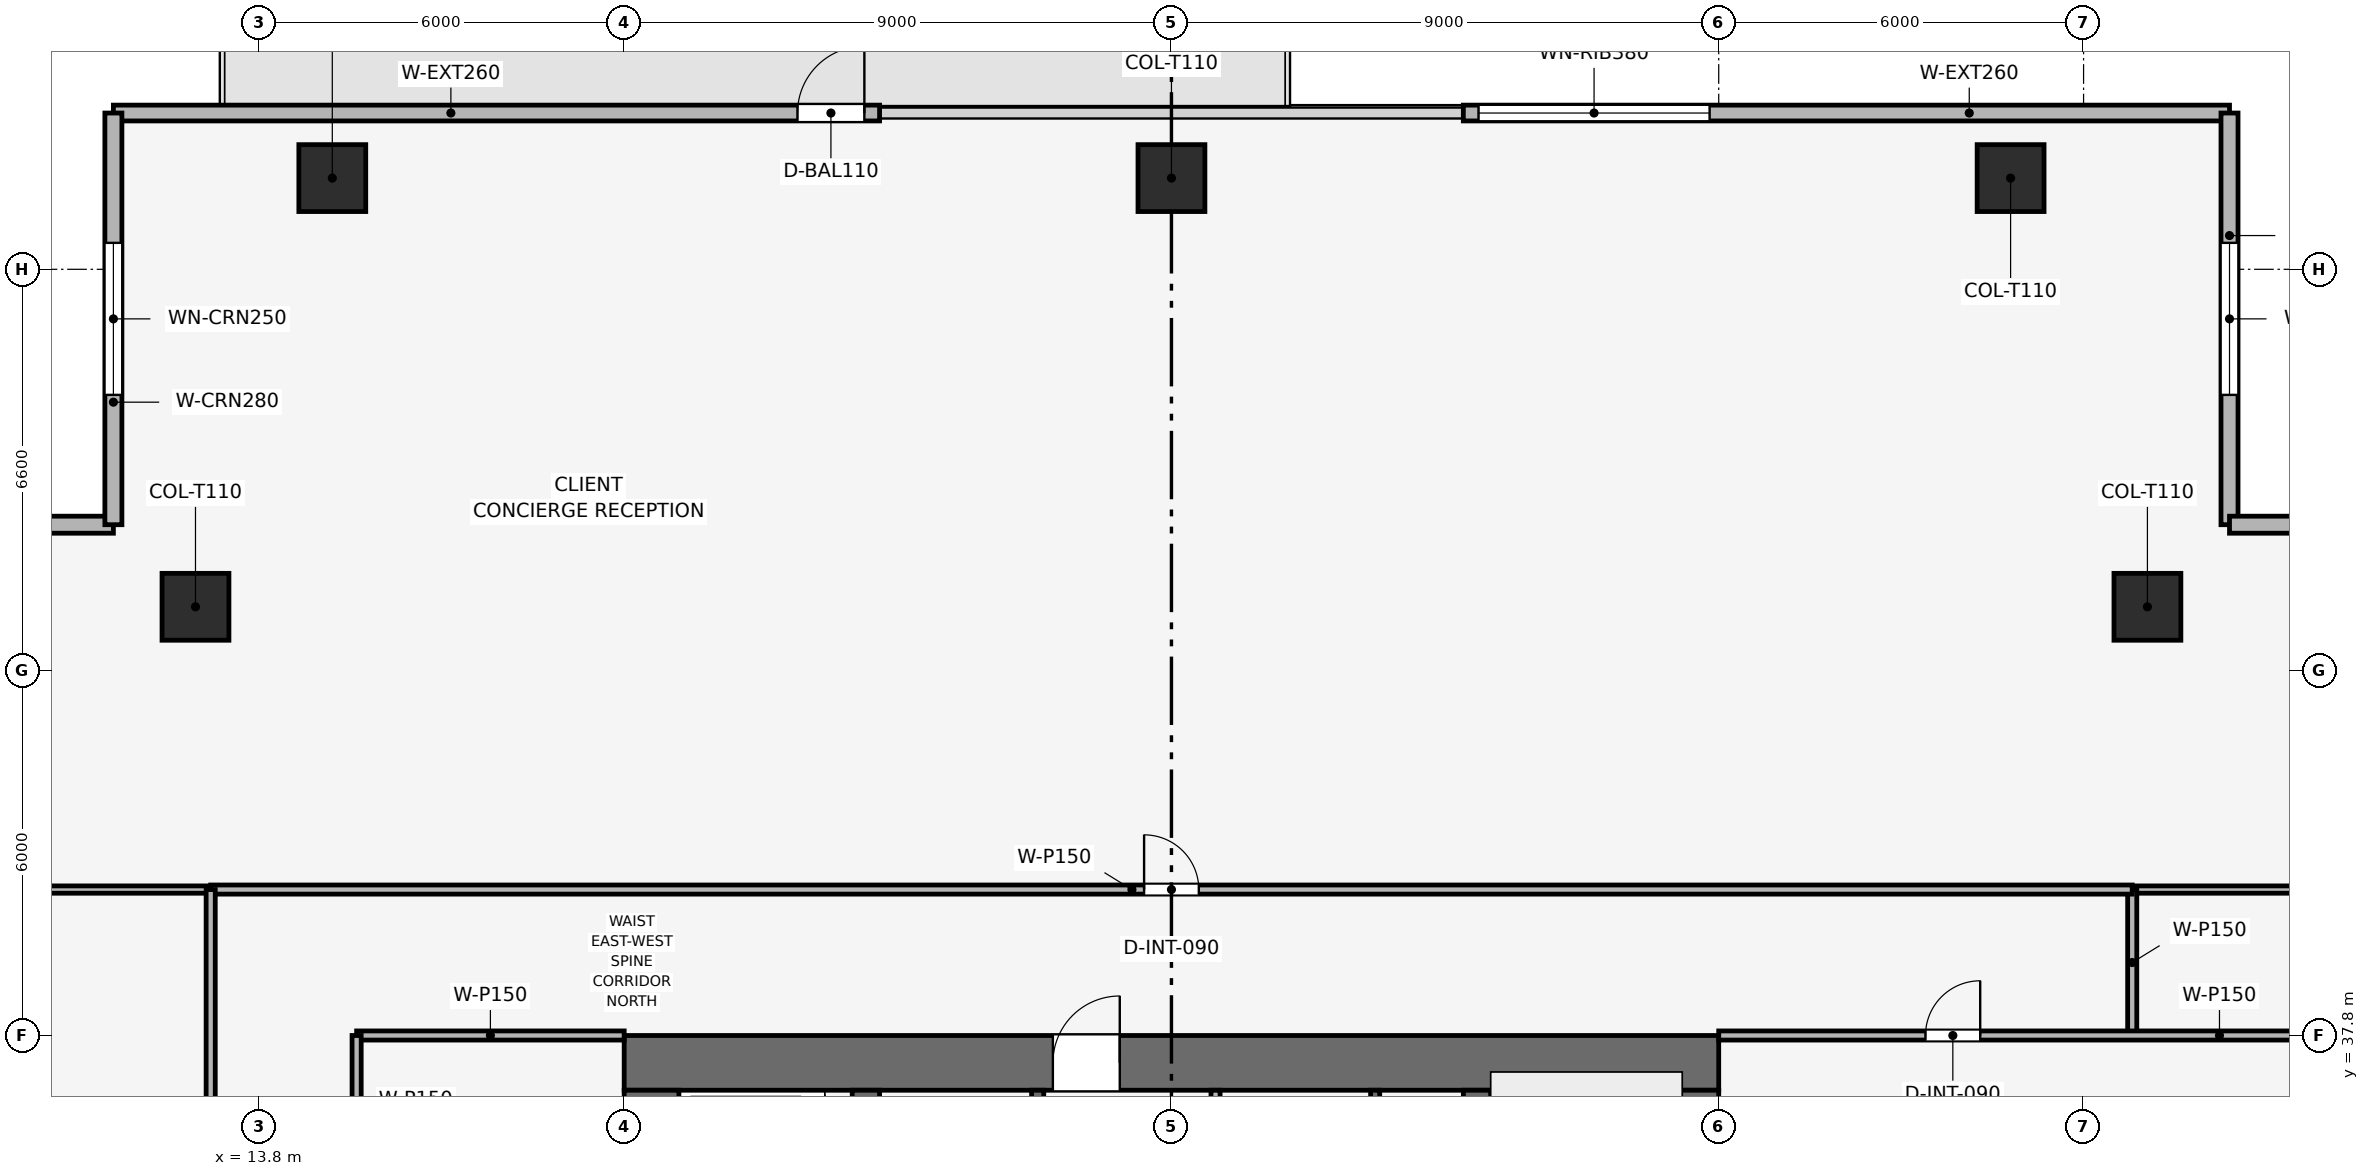
"""IFC4 building model, lengths in metres.
Left out: names, types, materials, properties, quantities, classifications, styles, units other than length and angle.
Written with IfcOpenShell. Run it as: python <this file> out.ifc"""

import sys

from ifc_helpers import new_model, si_unit, direction, frame, frame_2d, origin, origin_2d, place, context, subcontext, project, spatial, rectangle, extrude, element, fill, save


model = new_model("IFC4")
c1 = context("Model", 3, precision=1e-05, world=origin(), true_north=direction((0.0, 1.0)))
c2 = subcontext(c1, "Body", "Model", "MODEL_VIEW")
j1 = project(units=[si_unit("LENGTHUNIT", "METRE"), si_unit("PLANEANGLEUNIT", "RADIAN")], contexts=[c1])
p1 = place(None, origin())
s1 = spatial("IfcSite", under=j1, at=p1, CompositionType="ELEMENT")
p2 = place(p1, origin())
s2 = spatial("IfcBuilding", under=s1, at=p2, CompositionType="ELEMENT")
p3 = place(p2, frame((0.0, 0.0, 179.55)))
s3 = spatial("IfcBuildingStorey", under=s2, at=p3, CompositionType="ELEMENT", Elevation=179.55)
p4 = place(p3, frame((19.8, 37.35, 0.0), z_axis=(0.0, 0.0, 1.0), x_axis=(1.0, 0.0, 0.0)))
e1 = element("IfcWall", 1, at=p4, inside=s3, PredefinedType="SHEAR", context=c2, shape_type="SweptSolid", body=[
    extrude(rectangle(XDim=18.0, YDim=0.9, at=frame_2d((9.0, 0.0))), origin(), (0.0, 0.0, 1.0), 3.75),
])
p5 = place(p4, frame((7.05, 0.0, 0.0)))
e2 = element("IfcOpeningElement", 2, at=p5, cuts=e1, PredefinedType="OPENING", context=c2, shape_type="SweptSolid", body=[
    extrude(rectangle(XDim=1.1, YDim=2.15, at=frame_2d((0.55, 1.075))), frame((0.0, 0.46, 0.0), z_axis=(0.0, -1.0, 0.0), x_axis=(1.0, 0.0, 0.0)), (0.0, 0.0, 1.0), 0.92),
])
p6 = place(p3, frame((20.25, 20.7, 0.0), z_axis=(0.0, 0.0, 1.0), x_axis=(0.0, 1.0, 0.0)))
e3 = element("IfcWall", 3, at=p6, inside=s3, PredefinedType="SHEAR", context=c2, shape_type="SweptSolid", body=[
    extrude(rectangle(XDim=16.2, YDim=0.9, at=frame_2d((8.1, 0.0))), origin(), (0.0, 0.0, 1.0), 3.75),
])
p7 = place(p6, frame((10.1, 0.0, 0.0)))
e4 = element("IfcOpeningElement", 4, at=p7, cuts=e3, PredefinedType="OPENING", context=c2, shape_type="SweptSolid", body=[
    extrude(rectangle(XDim=1.1, YDim=2.15, at=frame_2d((0.55, 1.075))), frame((0.0, 0.46, 0.0), z_axis=(0.0, -1.0, 0.0), x_axis=(1.0, 0.0, 0.0)), (0.0, 0.0, 1.0), 0.92),
])
p8 = place(p3, frame((37.35, 20.7, 0.0), z_axis=(0.0, 0.0, 1.0), x_axis=(0.0, 1.0, 0.0)))
e5 = element("IfcWall", 5, at=p8, inside=s3, PredefinedType="SHEAR", context=c2, shape_type="SweptSolid", body=[
    extrude(rectangle(XDim=16.2, YDim=0.9, at=frame_2d((8.1, 0.0))), origin(), (0.0, 0.0, 1.0), 3.75),
])
p9 = place(p8, frame((4.6, 0.0, 0.0)))
e6 = element("IfcOpeningElement", 6, at=p9, cuts=e5, PredefinedType="OPENING", context=c2, shape_type="SweptSolid", body=[
    extrude(rectangle(XDim=1.1, YDim=2.15, at=frame_2d((0.55, 1.075))), frame((0.0, 0.46, 0.0), z_axis=(0.0, -1.0, 0.0), x_axis=(1.0, 0.0, 0.0)), (0.0, 0.0, 1.0), 0.92),
])
for number, where, z_axis, x_axis in (
    (7, (23.775, 20.7, 0.0), (0.0, 0.0, 1.0), (0.0, 1.0, 0.0)),
    (8, (33.825, 20.7, 0.0), (0.0, 0.0, 1.0), (0.0, 1.0, 0.0)),
):
    element("IfcWall", number, at=place(p3, frame(where, z_axis=z_axis, x_axis=x_axis)), inside=s3, PredefinedType="SHEAR", context=c2, shape_type="SweptSolid", body=[
        extrude(rectangle(XDim=16.2, YDim=0.45, at=frame_2d((8.1, 0.0))), origin(), (0.0, 0.0, 1.0), 3.75),
    ])
for number, where, z_axis, x_axis in (
    (9, (42.6, 51.9, 0.003), (0.0, 0.0, 1.0), (1.0, 0.0, 0.0)),
    (10, (28.8, 51.9, 0.003), (0.0, 0.0, 1.0), (1.0, 0.0, 0.0)),
    (11, (15.0, 51.9, 0.003), (0.0, 0.0, 1.0), (1.0, 0.0, 0.0)),
    (12, (44.85, 44.85, 0.003), (0.0, 0.0, 1.0), (1.0, 0.0, 0.0)),
    (13, (12.75, 44.85, 0.003), (0.0, 0.0, 1.0), (1.0, 0.0, 0.0)),
):
    element("IfcColumn", number, at=place(p3, frame(where, z_axis=z_axis, x_axis=x_axis)), inside=s3, PredefinedType="COLUMN", context=c2, shape_type="SweptSolid", body=[
        extrude(rectangle(XDim=1.1, YDim=1.1, at=origin_2d()), origin(), (0.0, 0.0, 1.0), 3.489),
    ])
p10 = place(p3, frame((11.4, 52.97, 0.0), z_axis=(0.0, 0.0, 1.0), x_axis=(1.0, 0.0, 0.0)))
e14 = element("IfcWall", 14, at=p10, inside=s3, PredefinedType="SOLIDWALL", context=c2, shape_type="SweptSolid", body=[
    extrude(rectangle(XDim=12.6, YDim=0.26, at=frame_2d((6.3, 0.0))), origin(), (0.0, 0.0, 1.0), 3.495),
])
p11 = place(p10, frame((11.25, 0.0, 0.0)))
e15 = element("IfcOpeningElement", 15, at=p11, cuts=e14, PredefinedType="OPENING", context=c2, shape_type="SweptSolid", body=[
    extrude(rectangle(XDim=1.1, YDim=2.2, at=frame_2d((0.55, 1.1))), frame((0.0, 0.14, 0.0), z_axis=(0.0, -1.0, 0.0), x_axis=(1.0, 0.0, 0.0)), (0.0, 0.0, 1.0), 0.28),
])
p12 = place(p3, frame((33.6, 52.97, 0.0), z_axis=(0.0, 0.0, 1.0), x_axis=(1.0, 0.0, 0.0)))
e16 = element("IfcWall", 16, at=p12, inside=s3, PredefinedType="SOLIDWALL", context=c2, shape_type="SweptSolid", body=[
    extrude(rectangle(XDim=12.6, YDim=0.26, at=frame_2d((6.3, 0.0))), origin(), (0.0, 0.0, 1.0), 3.495),
])
p13 = place(p12, frame((0.25, 0.0, 0.9)))
e17 = element("IfcOpeningElement", 17, at=p13, cuts=e16, PredefinedType="OPENING", context=c2, shape_type="SweptSolid", body=[
    extrude(rectangle(XDim=3.8, YDim=1.9, at=frame_2d((1.9, 0.95))), frame((0.0, 0.14, 0.0), z_axis=(0.0, -1.0, 0.0), x_axis=(1.0, 0.0, 0.0)), (0.0, 0.0, 1.0), 0.28),
])
p14 = place(p3, frame((4.63, 46.2, 0.0), z_axis=(0.0, 0.0, 1.0), x_axis=(1.0, 0.0, 0.0)))
e18 = element("IfcWall", 18, at=p14, inside=s3, PredefinedType="SOLIDWALL", context=c2, shape_type="SweptSolid", body=[
    extrude(rectangle(XDim=6.77, YDim=0.28, at=frame_2d((3.385, 0.0))), origin(), (0.0, 0.0, 1.0), 3.495),
])
p15 = place(p14, frame((2.135, 0.0, 0.9)))
e19 = element("IfcOpeningElement", 19, at=p15, cuts=e18, PredefinedType="OPENING", context=c2, shape_type="SweptSolid", body=[
    extrude(rectangle(XDim=2.5, YDim=1.9, at=frame_2d((1.25, 0.95))), frame((0.0, 0.15, 0.0), z_axis=(0.0, -1.0, 0.0), x_axis=(1.0, 0.0, 0.0)), (0.0, 0.0, 1.0), 0.3),
])
p16 = place(p3, frame((11.4, 46.2, 0.0), z_axis=(0.0, 0.0, 1.0), x_axis=(0.0, 1.0, 0.0)))
e20 = element("IfcWall", 20, at=p16, inside=s3, PredefinedType="SOLIDWALL", context=c2, shape_type="SweptSolid", body=[
    extrude(rectangle(XDim=6.77, YDim=0.28, at=frame_2d((3.385, 0.0))), origin(), (0.0, 0.0, 1.0), 3.495),
])
p17 = place(p16, frame((2.135, 0.0, 0.9)))
e21 = element("IfcOpeningElement", 21, at=p17, cuts=e20, PredefinedType="OPENING", context=c2, shape_type="SweptSolid", body=[
    extrude(rectangle(XDim=2.5, YDim=1.9, at=frame_2d((1.25, 0.95))), frame((0.0, 0.15, 0.0), z_axis=(0.0, -1.0, 0.0), x_axis=(1.0, 0.0, 0.0)), (0.0, 0.0, 1.0), 0.3),
])
p18 = place(p3, frame((46.2, 52.97, 0.0), z_axis=(0.0, 0.0, 1.0), x_axis=(0.0, -1.0, 0.0)))
e22 = element("IfcWall", 22, at=p18, inside=s3, PredefinedType="SOLIDWALL", context=c2, shape_type="SweptSolid", body=[
    extrude(rectangle(XDim=6.77, YDim=0.28, at=frame_2d((3.385, 0.0))), origin(), (0.0, 0.0, 1.0), 3.495),
])
p19 = place(p18, frame((2.135, 0.0, 0.9)))
e23 = element("IfcOpeningElement", 23, at=p19, cuts=e22, PredefinedType="OPENING", context=c2, shape_type="SweptSolid", body=[
    extrude(rectangle(XDim=2.5, YDim=1.9, at=frame_2d((1.25, 0.95))), frame((0.0, 0.15, 0.0), z_axis=(0.0, -1.0, 0.0), x_axis=(1.0, 0.0, 0.0)), (0.0, 0.0, 1.0), 0.3),
])
p20 = place(p3, frame((46.2, 46.2, 0.0), z_axis=(0.0, 0.0, 1.0), x_axis=(1.0, 0.0, 0.0)))
e24 = element("IfcWall", 24, at=p20, inside=s3, PredefinedType="SOLIDWALL", context=c2, shape_type="SweptSolid", body=[
    extrude(rectangle(XDim=6.77, YDim=0.28, at=frame_2d((3.385, 0.0))), origin(), (0.0, 0.0, 1.0), 3.495),
])
p21 = place(p20, frame((2.135, 0.0, 0.9)))
e25 = element("IfcOpeningElement", 25, at=p21, cuts=e24, PredefinedType="OPENING", context=c2, shape_type="SweptSolid", body=[
    extrude(rectangle(XDim=2.5, YDim=1.9, at=frame_2d((1.25, 0.95))), frame((0.0, 0.15, 0.0), z_axis=(0.0, -1.0, 0.0), x_axis=(1.0, 0.0, 0.0)), (0.0, 0.0, 1.0), 0.3),
])
p22 = place(p3, frame((32.15, 34.0, 0.0), z_axis=(0.0, 0.0, 1.0), x_axis=(0.0, 1.0, 0.0)))
e26 = element("IfcWall", 26, at=p22, inside=s3, PredefinedType="SHEAR", context=c2, shape_type="SweptSolid", body=[
    extrude(rectangle(XDim=2.9, YDim=0.15, at=frame_2d((1.45, 0.0))), origin(), (0.0, 0.0, 1.0), 3.495),
])
p23 = place(p3, frame((26.6, 34.0, 0.0), z_axis=(0.0, 0.0, 1.0), x_axis=(0.0, 1.0, 0.0)))
e27 = element("IfcWall", 27, at=p23, inside=s3, PredefinedType="SHEAR", context=c2, shape_type="SweptSolid", body=[
    extrude(rectangle(XDim=2.9, YDim=0.2, at=frame_2d((1.45, 0.0))), origin(), (0.0, 0.0, 1.0), 3.495),
])
p24 = place(p23, frame((0.75, 0.0, 0.0)))
e28 = element("IfcOpeningElement", 28, at=p24, cuts=e27, PredefinedType="OPENING", context=c2, shape_type="SweptSolid", body=[
    extrude(rectangle(XDim=1.1, YDim=2.15, at=frame_2d((0.55, 1.075))), frame((0.0, 0.11, 0.0), z_axis=(0.0, -1.0, 0.0), x_axis=(1.0, 0.0, 0.0)), (0.0, 0.0, 1.0), 0.22),
])
p25 = place(p3, frame((29.525, 33.925, 0.0), z_axis=(0.0, 0.0, 1.0), x_axis=(0.0, 1.0, 0.0)))
e29 = element("IfcWall", 29, at=p25, inside=s3, PredefinedType="PARTITIONING", context=c2, shape_type="SweptSolid", body=[
    extrude(rectangle(XDim=2.975, YDim=0.15, at=frame_2d((1.487, 0.0))), origin(), (0.0, 0.0, 1.0), 3.495),
])
p26 = place(p25, frame((0.85, 0.0, 0.0)))
e30 = element("IfcOpeningElement", 30, at=p26, cuts=e29, PredefinedType="OPENING", context=c2, shape_type="SweptSolid", body=[
    extrude(rectangle(XDim=0.9, YDim=2.1, at=frame_2d((0.45, 1.05))), frame((0.0, 0.085, 0.0), z_axis=(0.0, -1.0, 0.0), x_axis=(1.0, 0.0, 0.0)), (0.0, 0.0, 1.0), 0.17),
])
p27 = place(p3, frame((15.4, 37.8, 0.0), z_axis=(0.0, 0.0, 1.0), x_axis=(1.0, 0.0, 0.0)))
e31 = element("IfcWall", 31, at=p27, inside=s3, PredefinedType="PARTITIONING", context=c2, shape_type="SweptSolid", body=[
    extrude(rectangle(XDim=4.4, YDim=0.15, at=frame_2d((2.2, 0.0))), origin(), (0.0, 0.0, 1.0), 3.03),
])
p28 = place(p3, frame((15.4, 32.45, 0.0), z_axis=(0.0, 0.0, 1.0), x_axis=(0.0, 1.0, 0.0)))
e32 = element("IfcWall", 32, at=p28, inside=s3, PredefinedType="PARTITIONING", context=c2, shape_type="SweptSolid", body=[
    extrude(rectangle(XDim=5.35, YDim=0.15, at=frame_2d((2.675, 0.0))), origin(), (0.0, 0.0, 1.0), 3.03),
])
p29 = place(p28, frame((2.1, 0.0, 0.0)))
e33 = element("IfcOpeningElement", 33, at=p29, cuts=e32, PredefinedType="OPENING", context=c2, shape_type="SweptSolid", body=[
    extrude(rectangle(XDim=0.9, YDim=2.1, at=frame_2d((0.45, 1.05))), frame((0.0, 0.085, 0.0), z_axis=(0.0, -1.0, 0.0), x_axis=(1.0, 0.0, 0.0)), (0.0, 0.0, 1.0), 0.17),
])
p30 = place(p3, frame((4.63, 40.2, 0.0), z_axis=(0.0, 0.0, 1.0), x_axis=(1.0, 0.0, 0.0)))
e34 = element("IfcWall", 34, at=p30, inside=s3, PredefinedType="PARTITIONING", context=c2, shape_type="SweptSolid", body=[
    extrude(rectangle(XDim=8.37, YDim=0.12, at=frame_2d((4.185, 0.0))), origin(), (0.0, 0.0, 1.0), 2.98),
])
p31 = place(p3, frame((44.6, 40.2, 0.0), z_axis=(0.0, 0.0, 1.0), x_axis=(1.0, 0.0, 0.0)))
e35 = element("IfcWall", 35, at=p31, inside=s3, PredefinedType="PARTITIONING", context=c2, shape_type="SweptSolid", body=[
    extrude(rectangle(XDim=8.37, YDim=0.12, at=frame_2d((4.185, 0.0))), origin(), (0.0, 0.0, 1.0), 2.98),
])
p32 = place(p3, frame((44.6, 37.8, 0.0), z_axis=(0.0, 0.0, 1.0), x_axis=(0.0, 1.0, 0.0)))
e36 = element("IfcWall", 36, at=p32, inside=s3, PredefinedType="PARTITIONING", context=c2, shape_type="SweptSolid", body=[
    extrude(rectangle(XDim=2.4, YDim=0.15, at=frame_2d((1.2, 0.0))), origin(), (0.0, 0.0, 1.0), 3.495),
])
p33 = place(p3, frame((37.8, 37.8, 0.0), z_axis=(0.0, 0.0, 1.0), x_axis=(1.0, 0.0, 0.0)))
e37 = element("IfcWall", 37, at=p33, inside=s3, PredefinedType="PARTITIONING", context=c2, shape_type="SweptSolid", body=[
    extrude(rectangle(XDim=15.17, YDim=0.15, at=frame_2d((7.585, 0.0))), origin(), (0.0, 0.0, 1.0), 2.98),
])
p34 = place(p33, frame((3.4, 0.0, 0.0)))
e38 = element("IfcOpeningElement", 38, at=p34, cuts=e37, PredefinedType="OPENING", context=c2, shape_type="SweptSolid", body=[
    extrude(rectangle(XDim=0.9, YDim=2.1, at=frame_2d((0.45, 1.05))), frame((0.0, 0.085, 0.0), z_axis=(0.0, -1.0, 0.0), x_axis=(1.0, 0.0, 0.0)), (0.0, 0.0, 1.0), 0.17),
])
p35 = place(p3, frame((13.0, 40.2, 0.0), z_axis=(0.0, 0.0, 1.0), x_axis=(1.0, 0.0, 0.0)))
e39 = element("IfcWall", 39, at=p35, inside=s3, PredefinedType="PARTITIONING", context=c2, shape_type="SweptSolid", body=[
    extrude(rectangle(XDim=31.6, YDim=0.15, at=frame_2d((15.8, 0.0))), origin(), (0.0, 0.0, 1.0), 3.03),
])
p36 = place(p35, frame((15.35, 0.0, 0.0)))
e40 = element("IfcOpeningElement", 40, at=p36, cuts=e39, PredefinedType="OPENING", context=c2, shape_type="SweptSolid", body=[
    extrude(rectangle(XDim=0.9, YDim=2.1, at=frame_2d((0.45, 1.05))), frame((0.0, 0.085, 0.0), z_axis=(0.0, -1.0, 0.0), x_axis=(1.0, 0.0, 0.0)), (0.0, 0.0, 1.0), 0.17),
])
p37 = place(p3, frame((13.0, 17.4, 0.0), z_axis=(0.0, 0.0, 1.0), x_axis=(0.0, 1.0, 0.0)))
e41 = element("IfcWall", 41, at=p37, inside=s3, PredefinedType="PARTITIONING", context=c2, shape_type="SweptSolid", body=[
    extrude(rectangle(XDim=22.8, YDim=0.15, at=frame_2d((11.4, 0.0))), origin(), (0.0, 0.0, 1.0), 3.03),
])
p38 = place(p37, frame((3.113, 0.0, 0.0)))
e42 = element("IfcOpeningElement", 42, at=p38, cuts=e41, PredefinedType="OPENING", context=c2, shape_type="SweptSolid", body=[
    extrude(rectangle(XDim=0.9, YDim=2.1, at=frame_2d((0.45, 1.05))), frame((0.0, 0.085, 0.0), z_axis=(0.0, -1.0, 0.0), x_axis=(1.0, 0.0, 0.0)), (0.0, 0.0, 1.0), 0.17),
])
p39 = place(p37, frame((7.542, 0.0, 0.0)))
e43 = element("IfcOpeningElement", 43, at=p39, cuts=e41, PredefinedType="OPENING", context=c2, shape_type="SweptSolid", body=[
    extrude(rectangle(XDim=0.9, YDim=2.1, at=frame_2d((0.45, 1.05))), frame((0.0, 0.085, 0.0), z_axis=(0.0, -1.0, 0.0), x_axis=(1.0, 0.0, 0.0)), (0.0, 0.0, 1.0), 0.17),
])
p40 = place(p37, frame((15.378, 0.0, 0.0)))
e44 = element("IfcOpeningElement", 44, at=p40, cuts=e41, PredefinedType="OPENING", context=c2, shape_type="SweptSolid", body=[
    extrude(rectangle(XDim=0.9, YDim=2.1, at=frame_2d((0.45, 1.05))), frame((0.0, 0.085, 0.0), z_axis=(0.0, -1.0, 0.0), x_axis=(1.0, 0.0, 0.0)), (0.0, 0.0, 1.0), 0.17),
])
p41 = place(p11, origin())
e45 = element("IfcDoor", 45, at=p41, inside=s3, OperationType="SINGLE_SWING_RIGHT", PredefinedType="DOOR", context=c2, shape_type="SweptSolid", body=[
    extrude(rectangle(XDim=1.1, YDim=2.2, at=frame_2d((0.55, 1.1))), frame((0.0, 0.025, 0.0), z_axis=(0.0, -1.0, 0.0), x_axis=(1.0, 0.0, 0.0)), (0.0, 0.0, 1.0), 0.05),
])
fill(e15, e45)
p42 = place(p13, origin())
e46 = element("IfcWindow", 46, at=p42, inside=s3, PartitioningType="SINGLE_PANEL", PredefinedType="WINDOW", context=c2, shape_type="SweptSolid", body=[
    extrude(rectangle(XDim=3.8, YDim=1.9, at=frame_2d((1.9, 0.95))), frame((0.0, 0.03, 0.0), z_axis=(0.0, -1.0, 0.0), x_axis=(1.0, 0.0, 0.0)), (0.0, 0.0, 1.0), 0.06),
])
fill(e17, e46)
p43 = place(p17, origin())
e47 = element("IfcWindow", 47, at=p43, inside=s3, PartitioningType="SINGLE_PANEL", PredefinedType="WINDOW", context=c2, shape_type="SweptSolid", body=[
    extrude(rectangle(XDim=2.5, YDim=1.9, at=frame_2d((1.25, 0.95))), frame((0.0, 0.03, 0.0), z_axis=(0.0, -1.0, 0.0), x_axis=(1.0, 0.0, 0.0)), (0.0, 0.0, 1.0), 0.06),
])
fill(e21, e47)
p44 = place(p19, origin())
e48 = element("IfcWindow", 48, at=p44, inside=s3, PartitioningType="SINGLE_PANEL", PredefinedType="WINDOW", context=c2, shape_type="SweptSolid", body=[
    extrude(rectangle(XDim=2.5, YDim=1.9, at=frame_2d((1.25, 0.95))), frame((0.0, 0.03, 0.0), z_axis=(0.0, -1.0, 0.0), x_axis=(1.0, 0.0, 0.0)), (0.0, 0.0, 1.0), 0.06),
])
fill(e23, e48)
p45 = place(p34, origin())
e49 = element("IfcDoor", 49, at=p45, inside=s3, OperationType="SINGLE_SWING_RIGHT", PredefinedType="DOOR", context=c2, shape_type="SweptSolid", body=[
    extrude(rectangle(XDim=0.9, YDim=2.1, at=frame_2d((0.45, 1.05))), frame((0.0, 0.025, 0.0), z_axis=(0.0, -1.0, 0.0), x_axis=(1.0, 0.0, 0.0)), (0.0, 0.0, 1.0), 0.05),
])
fill(e38, e49)
p46 = place(p36, origin())
e50 = element("IfcDoor", 50, at=p46, inside=s3, OperationType="SINGLE_SWING_LEFT", PredefinedType="DOOR", context=c2, shape_type="SweptSolid", body=[
    extrude(rectangle(XDim=0.9, YDim=2.1, at=frame_2d((0.45, 1.05))), frame((0.0, 0.025, 0.0), z_axis=(0.0, -1.0, 0.0), x_axis=(1.0, 0.0, 0.0)), (0.0, 0.0, 1.0), 0.05),
])
fill(e40, e50)
p47 = place(p5, origin())
e51 = element("IfcDoor", 51, at=p47, inside=s3, OperationType="SINGLE_SWING_RIGHT", PredefinedType="DOOR", context=c2, shape_type="SweptSolid", body=[
    extrude(rectangle(XDim=1.1, YDim=2.15, at=frame_2d((0.55, 1.075))), frame((0.0, 0.025, 0.0), z_axis=(0.0, -1.0, 0.0), x_axis=(1.0, 0.0, 0.0)), (0.0, 0.0, 1.0), 0.05),
])
fill(e2, e51)
save(model, sys.argv[1])
